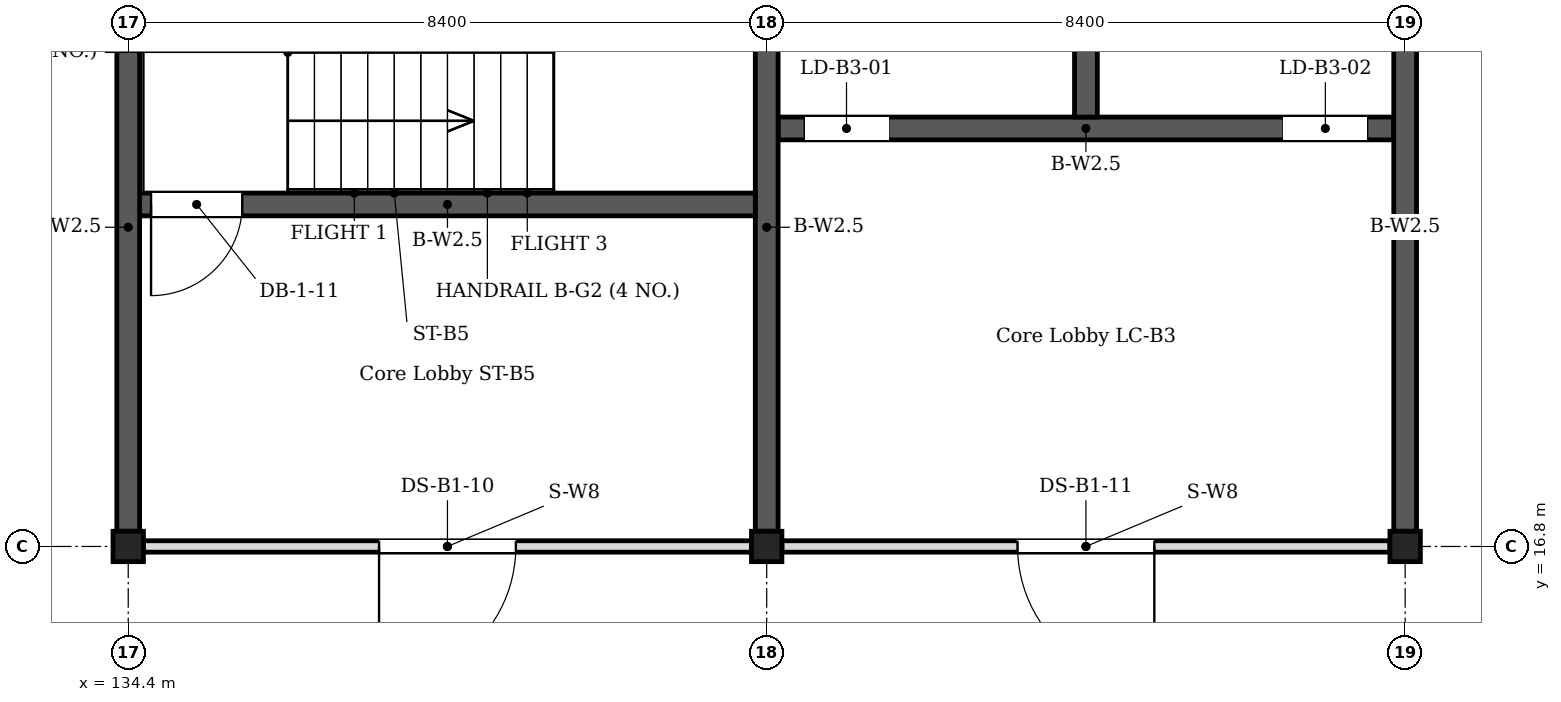
"""IFC4 building model, lengths in metres.
Left out: names, types, materials, properties, quantities, classifications, styles, units other than length and angle.
Written with IfcOpenShell. Run it as: python <this file> out.ifc"""

import sys

from ifc_helpers import new_model, si_unit, direction, frame, frame_2d, origin, origin_2d, place, context, subcontext, project, spatial, rectangle, i_section, extrude, element, fill, save


model = new_model("IFC4")
c1 = context("Model", 3, precision=1e-05, world=origin(), true_north=direction((0.0, 1.0)))
c2 = subcontext(c1, "Body", "Model", "MODEL_VIEW")
j1 = project(units=[si_unit("LENGTHUNIT", "METRE"), si_unit("PLANEANGLEUNIT", "RADIAN")], contexts=[c1])
p1 = place(None, origin())
s1 = spatial("IfcSite", under=j1, at=p1, CompositionType="ELEMENT")
p2 = place(p1, origin())
s2 = spatial("IfcBuilding", under=s1, at=p2, CompositionType="ELEMENT")
p3 = place(p2, frame((0.0, 0.0, -5.4)))
s3 = spatial("IfcBuildingStorey", under=s2, at=p3, CompositionType="ELEMENT", Elevation=-5.4)
for number, where, z_axis, x_axis in (
    (1, (134.4, 16.8, 0.0), (0.0, 0.0, 1.0), (1.0, 0.0, 0.0)),
    (2, (142.8, 16.8, 0.0), (0.0, 0.0, 1.0), (1.0, 0.0, 0.0)),
    (3, (151.2, 16.8, 0.0), (0.0, 0.0, 1.0), (1.0, 0.0, 0.0)),
):
    element("IfcColumn", number, at=place(p3, frame(where, z_axis=z_axis, x_axis=x_axis)), inside=s3, PredefinedType="COLUMN", context=c2, shape_type="SweptSolid", body=[
        extrude(i_section(OverallWidth=0.4, OverallDepth=0.4, WebThickness=0.013, FlangeThickness=0.021, FilletRadius=0.022, at=origin_2d()), origin(), (0.0, 0.0, 1.0), 5.4),
    ])
for number, where, z_axis, x_axis in (
    (4, (142.8, 17.0, 0.0), (0.0, 0.0, 1.0), (0.0, 1.0, 0.0)),
    (5, (151.2, 17.0, 0.0), (0.0, 0.0, 1.0), (0.0, 1.0, 0.0)),
):
    element("IfcWall", number, at=place(p3, frame(where, z_axis=z_axis, x_axis=x_axis)), inside=s3, PredefinedType="SHEAR", context=c2, shape_type="SweptSolid", body=[
        extrude(rectangle(XDim=8.0, YDim=0.3, at=frame_2d((4.0, 0.0))), origin(), (0.0, 0.0, 1.0), 4.95),
    ])
p4 = place(p3, frame((142.95, 22.3, 0.0), z_axis=(0.0, 0.0, 1.0), x_axis=(1.0, 0.0, 0.0)))
e6 = element("IfcWall", 6, at=p4, inside=s3, PredefinedType="SHEAR", context=c2, shape_type="SweptSolid", body=[
    extrude(rectangle(XDim=8.1, YDim=0.3, at=frame_2d((4.05, 0.0))), origin(), (0.0, 0.0, 1.0), 4.95),
])
p5 = place(p4, frame((0.35, 0.0, 0.0)))
e7 = element("IfcOpeningElement", 7, at=p5, cuts=e6, PredefinedType="OPENING", context=c2, shape_type="SweptSolid", body=[
    extrude(rectangle(XDim=1.1, YDim=2.2, at=frame_2d((0.55, 1.1))), frame((0.0, 0.16, 0.0), z_axis=(0.0, -1.0, 0.0), x_axis=(1.0, 0.0, 0.0)), (0.0, 0.0, 1.0), 0.32),
])
p6 = place(p4, frame((6.65, 0.0, 0.0)))
e8 = element("IfcOpeningElement", 8, at=p6, cuts=e6, PredefinedType="OPENING", context=c2, shape_type="SweptSolid", body=[
    extrude(rectangle(XDim=1.1, YDim=2.2, at=frame_2d((0.55, 1.1))), frame((0.0, 0.16, 0.0), z_axis=(0.0, -1.0, 0.0), x_axis=(1.0, 0.0, 0.0)), (0.0, 0.0, 1.0), 0.32),
])
p7 = place(p3, frame((147.0, 22.45, 0.0), z_axis=(0.0, 0.0, 1.0), x_axis=(0.0, 1.0, 0.0)))
e9 = element("IfcWall", 9, at=p7, inside=s3, PredefinedType="SHEAR", context=c2, shape_type="SweptSolid", body=[
    extrude(rectangle(XDim=2.95, YDim=0.3, at=frame_2d((1.475, 0.0))), origin(), (0.0, 0.0, 1.0), 4.95),
])
p8 = place(p3, frame((134.4, 17.0, 0.0), z_axis=(0.0, 0.0, 1.0), x_axis=(0.0, 1.0, 0.0)))
e10 = element("IfcWall", 10, at=p8, inside=s3, PredefinedType="SHEAR", context=c2, shape_type="SweptSolid", body=[
    extrude(rectangle(XDim=8.0, YDim=0.3, at=frame_2d((4.0, 0.0))), origin(), (0.0, 0.0, 1.0), 4.95),
])
p9 = place(p3, frame((134.55, 21.3, 0.0), z_axis=(0.0, 0.0, 1.0), x_axis=(1.0, 0.0, 0.0)))
e11 = element("IfcWall", 11, at=p9, inside=s3, PredefinedType="SHEAR", context=c2, shape_type="SweptSolid", body=[
    extrude(rectangle(XDim=8.1, YDim=0.3, at=frame_2d((4.05, 0.0))), origin(), (0.0, 0.0, 1.0), 4.95),
])
p10 = place(p9, frame((0.15, 0.0, 0.0)))
e12 = element("IfcOpeningElement", 12, at=p10, cuts=e11, PredefinedType="OPENING", context=c2, shape_type="SweptSolid", body=[
    extrude(rectangle(XDim=1.2, YDim=2.1, at=frame_2d((0.6, 1.05))), frame((0.0, 0.16, 0.0), z_axis=(0.0, -1.0, 0.0), x_axis=(1.0, 0.0, 0.0)), (0.0, 0.0, 1.0), 0.32),
])
p11 = place(p3, frame((134.6, 16.8, 0.0), z_axis=(0.0, 0.0, 1.0), x_axis=(1.0, 0.0, 0.0)))
e13 = element("IfcWall", 13, at=p11, inside=s3, PredefinedType="PARTITIONING", context=c2, shape_type="SweptSolid", body=[
    extrude(rectangle(XDim=8.0, YDim=0.15, at=frame_2d((4.0, 0.0))), origin(), (0.0, 0.0, 1.0), 4.95),
])
p12 = place(p11, frame((3.1, 0.0, 0.0)))
e14 = element("IfcOpeningElement", 14, at=p12, cuts=e13, PredefinedType="OPENING", context=c2, shape_type="SweptSolid", body=[
    extrude(rectangle(XDim=1.8, YDim=2.1, at=frame_2d((0.9, 1.05))), frame((0.0, 0.085, 0.0), z_axis=(0.0, -1.0, 0.0), x_axis=(1.0, 0.0, 0.0)), (0.0, 0.0, 1.0), 0.17),
])
p13 = place(p3, frame((143.0, 16.8, 0.0), z_axis=(0.0, 0.0, 1.0), x_axis=(1.0, 0.0, 0.0)))
e15 = element("IfcWall", 15, at=p13, inside=s3, PredefinedType="PARTITIONING", context=c2, shape_type="SweptSolid", body=[
    extrude(rectangle(XDim=8.0, YDim=0.15, at=frame_2d((4.0, 0.0))), origin(), (0.0, 0.0, 1.0), 4.95),
])
p14 = place(p13, frame((3.1, 0.0, 0.0)))
e16 = element("IfcOpeningElement", 16, at=p14, cuts=e15, PredefinedType="OPENING", context=c2, shape_type="SweptSolid", body=[
    extrude(rectangle(XDim=1.8, YDim=2.1, at=frame_2d((0.9, 1.05))), frame((0.0, 0.085, 0.0), z_axis=(0.0, -1.0, 0.0), x_axis=(1.0, 0.0, 0.0)), (0.0, 0.0, 1.0), 0.17),
])
p15 = place(p12, origin())
e17 = element("IfcDoor", 17, at=p15, inside=s3, OperationType="DOUBLE_DOOR_SINGLE_SWING", PredefinedType="DOOR", context=c2, shape_type="SweptSolid", body=[
    extrude(rectangle(XDim=1.8, YDim=2.1, at=frame_2d((0.9, 1.05))), frame((0.0, 0.025, 0.0), z_axis=(0.0, -1.0, 0.0), x_axis=(1.0, 0.0, 0.0)), (0.0, 0.0, 1.0), 0.05),
])
fill(e14, e17)
p16 = place(p14, origin())
e18 = element("IfcDoor", 18, at=p16, inside=s3, OperationType="DOUBLE_DOOR_SINGLE_SWING", PredefinedType="DOOR", context=c2, shape_type="SweptSolid", body=[
    extrude(rectangle(XDim=1.8, YDim=2.1, at=frame_2d((0.9, 1.05))), frame((0.0, 0.025, 0.0), z_axis=(0.0, -1.0, 0.0), x_axis=(1.0, 0.0, 0.0)), (0.0, 0.0, 1.0), 0.05),
])
fill(e16, e18)
p17 = place(p5, origin())
e19 = element("IfcDoor", 19, at=p17, inside=s3, OperationType="SLIDING_TO_LEFT", PredefinedType="DOOR", context=c2, shape_type="SweptSolid", body=[
    extrude(rectangle(XDim=1.1, YDim=2.2, at=frame_2d((0.55, 1.1))), frame((0.0, 0.025, 0.0), z_axis=(0.0, -1.0, 0.0), x_axis=(1.0, 0.0, 0.0)), (0.0, 0.0, 1.0), 0.05),
])
fill(e7, e19)
p18 = place(p6, origin())
e20 = element("IfcDoor", 20, at=p18, inside=s3, OperationType="SLIDING_TO_LEFT", PredefinedType="DOOR", context=c2, shape_type="SweptSolid", body=[
    extrude(rectangle(XDim=1.1, YDim=2.2, at=frame_2d((0.55, 1.1))), frame((0.0, 0.025, 0.0), z_axis=(0.0, -1.0, 0.0), x_axis=(1.0, 0.0, 0.0)), (0.0, 0.0, 1.0), 0.05),
])
fill(e8, e20)
p19 = place(p10, origin())
e21 = element("IfcDoor", 21, at=p19, inside=s3, OperationType="SINGLE_SWING_LEFT", PredefinedType="DOOR", context=c2, shape_type="SweptSolid", body=[
    extrude(rectangle(XDim=1.2, YDim=2.1, at=frame_2d((0.6, 1.05))), frame((0.0, 0.025, 0.0), z_axis=(0.0, -1.0, 0.0), x_axis=(1.0, 0.0, 0.0)), (0.0, 0.0, 1.0), 0.05),
])
fill(e12, e21)
save(model, sys.argv[1])
